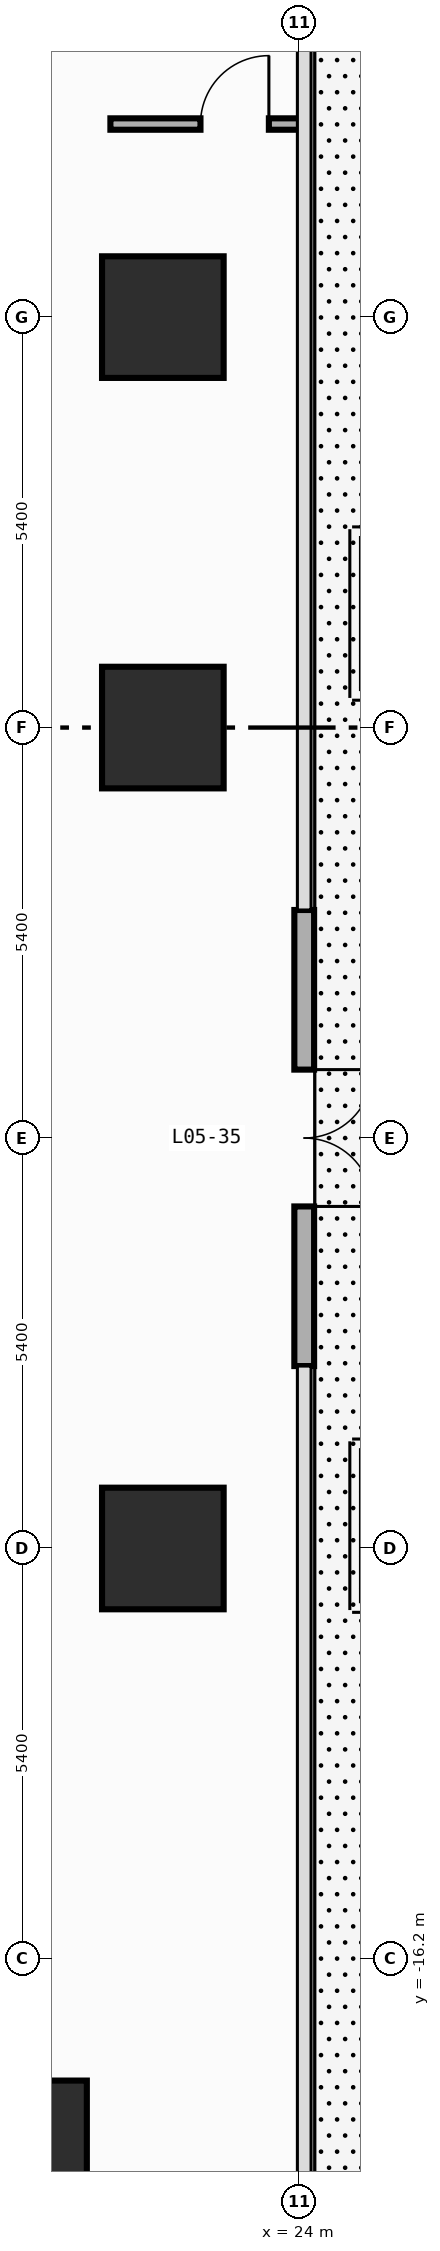
"""IFC4 building model, lengths in metres.
Left out: names, types, materials, properties, quantities, classifications, styles, units other than length and angle.
Written with IfcOpenShell. Run it as: python <this file> out.ifc"""

import sys

from ifc_helpers import new_model, si_unit, direction, frame, frame_2d, origin, origin_2d, place, context, subcontext, project, spatial, rectangle, extrude, element, fill, save


model = new_model("IFC4")
c1 = context("Model", 3, precision=1e-05, world=origin(), true_north=direction((0.0, 1.0)))
c2 = subcontext(c1, "Body", "Model", "MODEL_VIEW")
j1 = project(units=[si_unit("LENGTHUNIT", "METRE"), si_unit("PLANEANGLEUNIT", "RADIAN")], contexts=[c1])
p1 = place(None, origin())
s1 = spatial("IfcSite", under=j1, at=p1, CompositionType="ELEMENT")
p2 = place(p1, origin())
s2 = spatial("IfcBuilding", under=s1, at=p2, CompositionType="ELEMENT")
p3 = place(p2, frame((0.0, 0.0, 21.0)))
s3 = spatial("IfcBuildingStorey", under=s2, at=p3, CompositionType="ELEMENT", Elevation=21.0)
for number, where, z_axis, x_axis in (
    (1, (20.4, -18.6, 0.0), (0.0, 0.0, 1.0), (1.0, 0.0, 0.0)),
    (2, (22.2, -10.8, 0.0), (0.0, 0.0, 1.0), (1.0, 0.0, 0.0)),
    (3, (22.2, 0.0, 0.0), (0.0, 0.0, 1.0), (1.0, 0.0, 0.0)),
    (4, (22.2, 5.4, 0.0), (0.0, 0.0, 1.0), (1.0, 0.0, 0.0)),
):
    element("IfcColumn", number, at=place(p3, frame(where, z_axis=z_axis, x_axis=x_axis)), inside=s3, PredefinedType="COLUMN", context=c2, shape_type="SweptSolid", body=[
        extrude(rectangle(XDim=1.6, YDim=1.6, at=origin_2d()), origin(), (0.0, 0.0, 1.0), 5.0),
    ])
p4 = place(p3, frame((24.06, -2.4, 0.0), z_axis=(0.0, 0.0, 1.0), x_axis=(0.0, -1.0, 0.0)))
e5 = element("IfcWall", 5, at=p4, inside=s3, PredefinedType="STANDARD", context=c2, shape_type="SweptSolid", body=[
    extrude(rectangle(XDim=6.0, YDim=0.26, at=frame_2d((3.0, 0.0))), origin(), (0.0, 0.0, 1.0), 4.74),
])
p5 = place(p4, frame((2.1, 0.0, 0.0)))
e6 = element("IfcOpeningElement", 6, at=p5, cuts=e5, PredefinedType="OPENING", context=c2, shape_type="SweptSolid", body=[
    extrude(rectangle(XDim=1.8, YDim=2.3, at=frame_2d((0.9, 1.15))), frame((0.0, 0.14, 0.0), z_axis=(0.0, -1.0, 0.0), x_axis=(1.0, 0.0, 0.0)), (0.0, 0.0, 1.0), 0.28),
])
p6 = place(p3, frame((21.51, 7.94, 0.0), z_axis=(0.0, 0.0, 1.0), x_axis=(1.0, 0.0, 0.0)))
e7 = element("IfcWall", 7, at=p6, inside=s3, PredefinedType="PARTITIONING", context=c2, shape_type="SweptSolid", body=[
    extrude(rectangle(XDim=2.545, YDim=0.15, at=frame_2d((1.272, 0.0))), origin(), (0.0, 0.0, 1.0), 4.74),
])
p7 = place(p6, frame((1.185, 0.0, 0.0)))
e8 = element("IfcOpeningElement", 8, at=p7, cuts=e7, PredefinedType="OPENING", context=c2, shape_type="SweptSolid", body=[
    extrude(rectangle(XDim=0.9, YDim=2.15, at=frame_2d((0.45, 1.075))), frame((0.0, 0.085, 0.0), z_axis=(0.0, -1.0, 0.0), x_axis=(1.0, 0.0, 0.0)), (0.0, 0.0, 1.0), 0.17),
])
p8 = place(p5, origin())
e9 = element("IfcDoor", 9, at=p8, inside=s3, OperationType="DOUBLE_DOOR_SINGLE_SWING", PredefinedType="DOOR", context=c2, shape_type="SweptSolid", body=[
    extrude(rectangle(XDim=1.8, YDim=2.3, at=frame_2d((0.9, 1.15))), frame((0.0, 0.025, 0.0), z_axis=(0.0, -1.0, 0.0), x_axis=(1.0, 0.0, 0.0)), (0.0, 0.0, 1.0), 0.05),
])
fill(e6, e9)
p9 = place(p7, origin())
e10 = element("IfcDoor", 10, at=p9, inside=s3, OperationType="SINGLE_SWING_RIGHT", PredefinedType="DOOR", context=c2, shape_type="SweptSolid", body=[
    extrude(rectangle(XDim=0.9, YDim=2.15, at=frame_2d((0.45, 1.075))), frame((0.0, 0.025, 0.0), z_axis=(0.0, -1.0, 0.0), x_axis=(1.0, 0.0, 0.0)), (0.0, 0.0, 1.0), 0.05),
])
fill(e8, e10)
save(model, sys.argv[1])
